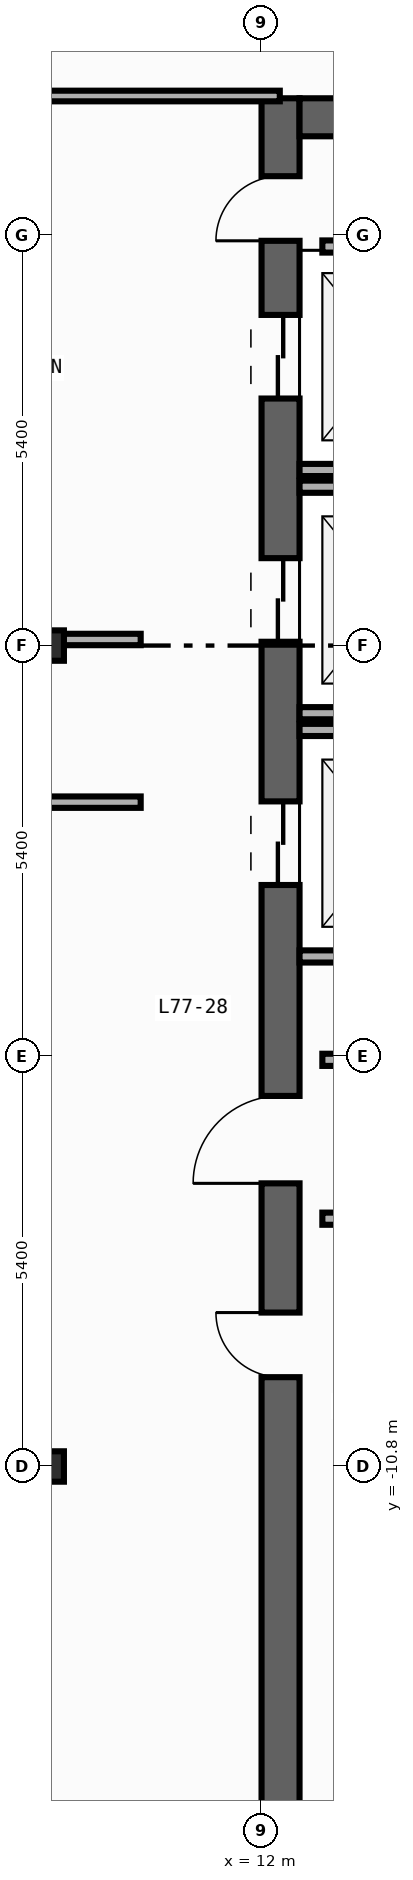
"""IFC4 building model, lengths in metres.
Left out: names, types, materials, properties, quantities, classifications, styles, units other than length and angle.
Written with IfcOpenShell. Run it as: python <this file> out.ifc"""

import sys

from ifc_helpers import new_model, si_unit, direction, frame, frame_2d, origin, origin_2d, place, context, subcontext, project, spatial, rectangle, i_section, extrude, element, fill, save


model = new_model("IFC4")
c1 = context("Model", 3, precision=1e-05, world=origin(), true_north=direction((0.0, 1.0)))
c2 = subcontext(c1, "Body", "Model", "MODEL_VIEW")
j1 = project(units=[si_unit("LENGTHUNIT", "METRE"), si_unit("PLANEANGLEUNIT", "RADIAN")], contexts=[c1])
p1 = place(None, origin())
s1 = spatial("IfcSite", under=j1, at=p1, CompositionType="ELEMENT")
p2 = place(p1, origin())
s2 = spatial("IfcBuilding", under=s1, at=p2, CompositionType="ELEMENT")
p3 = place(p2, frame((0.0, 0.0, 320.4)))
s3 = spatial("IfcBuildingStorey", under=s2, at=p3, CompositionType="ELEMENT", Elevation=320.4)
p4 = place(p3, frame((12.25, -19.8, 0.0), z_axis=(0.0, 0.0, 1.0), x_axis=(0.0, 1.0, 0.0)))
e1 = element("IfcWall", 1, at=p4, inside=s3, PredefinedType="SHEAR", context=c2, shape_type="SweptSolid", body=[
    extrude(rectangle(XDim=27.0, YDim=0.5, at=frame_2d((13.5, 0.0))), origin(), (0.0, 0.0, 1.0), 4.45),
])
p5 = place(p4, frame((23.05, 0.0, 0.0)))
e2 = element("IfcOpeningElement", 2, at=p5, cuts=e1, PredefinedType="OPENING", context=c2, shape_type="SweptSolid", body=[
    extrude(rectangle(XDim=1.1, YDim=2.2, at=frame_2d((0.55, 1.1))), frame((0.0, 0.26, 0.0), z_axis=(0.0, -1.0, 0.0), x_axis=(1.0, 0.0, 0.0)), (0.0, 0.0, 1.0), 0.52),
])
p6 = place(p4, frame((19.85, 0.0, 0.0)))
e3 = element("IfcOpeningElement", 3, at=p6, cuts=e1, PredefinedType="OPENING", context=c2, shape_type="SweptSolid", body=[
    extrude(rectangle(XDim=1.1, YDim=2.2, at=frame_2d((0.55, 1.1))), frame((0.0, 0.26, 0.0), z_axis=(0.0, -1.0, 0.0), x_axis=(1.0, 0.0, 0.0)), (0.0, 0.0, 1.0), 0.52),
])
p7 = place(p4, frame((16.65, 0.0, 0.0)))
e4 = element("IfcOpeningElement", 4, at=p7, cuts=e1, PredefinedType="OPENING", context=c2, shape_type="SweptSolid", body=[
    extrude(rectangle(XDim=1.1, YDim=2.2, at=frame_2d((0.55, 1.1))), frame((0.0, 0.26, 0.0), z_axis=(0.0, -1.0, 0.0), x_axis=(1.0, 0.0, 0.0)), (0.0, 0.0, 1.0), 0.52),
])
p8 = place(p4, frame((10.175, 0.0, 0.0)))
e5 = element("IfcOpeningElement", 5, at=p8, cuts=e1, PredefinedType="OPENING", context=c2, shape_type="SweptSolid", body=[
    extrude(rectangle(XDim=0.85, YDim=2.1, at=frame_2d((0.425, 1.05))), frame((0.0, 0.26, 0.0), z_axis=(0.0, -1.0, 0.0), x_axis=(1.0, 0.0, 0.0)), (0.0, 0.0, 1.0), 0.52),
])
p9 = place(p4, frame((12.725, 0.0, 0.0)))
e6 = element("IfcOpeningElement", 6, at=p9, cuts=e1, PredefinedType="OPENING", context=c2, shape_type="SweptSolid", body=[
    extrude(rectangle(XDim=1.15, YDim=2.2, at=frame_2d((0.575, 1.1))), frame((0.0, 0.26, 0.0), z_axis=(0.0, -1.0, 0.0), x_axis=(1.0, 0.0, 0.0)), (0.0, 0.0, 1.0), 0.52),
])
p10 = place(p4, frame((25.125, 0.0, 0.0)))
e7 = element("IfcOpeningElement", 7, at=p10, cuts=e1, PredefinedType="OPENING", context=c2, shape_type="SweptSolid", body=[
    extrude(rectangle(XDim=0.85, YDim=2.1, at=frame_2d((0.425, 1.05))), frame((0.0, 0.26, 0.0), z_axis=(0.0, -1.0, 0.0), x_axis=(1.0, 0.0, 0.0)), (0.0, 0.0, 1.0), 0.52),
])
p11 = place(p3, frame((12.5, 6.95, 0.0), z_axis=(0.0, 0.0, 1.0), x_axis=(1.0, 0.0, 0.0)))
e8 = element("IfcWall", 8, at=p11, inside=s3, PredefinedType="SHEAR", context=c2, shape_type="SweptSolid", body=[
    extrude(rectangle(XDim=7.4, YDim=0.5, at=frame_2d((3.7, 0.0))), origin(), (0.0, 0.0, 1.0), 4.45),
])
for number, where, z_axis, x_axis in (
    (9, (9.2, -10.8, 0.0), (0.0, 0.0, 1.0), (1.0, 0.0, 0.0)),
    (10, (9.2, 0.0, 0.0), (0.0, 0.0, 1.0), (1.0, 0.0, 0.0)),
):
    element("IfcColumn", number, at=place(p3, frame(where, z_axis=z_axis, x_axis=x_axis)), inside=s3, PredefinedType="COLUMN", context=c2, shape_type="SweptSolid", body=[
        extrude(i_section(OverallWidth=0.4, OverallDepth=0.4, WebThickness=0.013, FlangeThickness=0.021, FilletRadius=0.022, at=origin_2d()), origin(), (0.0, 0.0, 1.0), 4.8),
    ])
for number, where, z_axis, x_axis in (
    (11, (12.5, 2.31, 0.0), (0.0, 0.0, 1.0), (1.0, 0.0, 0.0)),
    (12, (12.5, -0.89, 0.0), (0.0, 0.0, 1.0), (1.0, 0.0, 0.0)),
    (13, (12.5, 2.09, 0.0), (0.0, 0.0, 1.0), (1.0, 0.0, 0.0)),
    (14, (12.5, -4.09, 0.0), (0.0, 0.0, 1.0), (1.0, 0.0, 0.0)),
    (15, (12.5, -1.11, 0.0), (0.0, 0.0, 1.0), (1.0, 0.0, 0.0)),
):
    element("IfcWall", number, at=place(p3, frame(where, z_axis=z_axis, x_axis=x_axis)), inside=s3, PredefinedType="STANDARD", context=c2, shape_type="SweptSolid", body=[
        extrude(rectangle(XDim=2.49, YDim=0.16, at=frame_2d((1.245, 0.0))), origin(), (0.0, 0.0, 1.0), 4.45),
    ])
for number, where, z_axis, x_axis in (
    (16, (12.8, -5.45, 0.0), (0.0, 0.0, 1.0), (1.0, 0.0, 0.0)),
    (17, (12.8, -7.54, 0.0), (0.0, 0.0, 1.0), (1.0, 0.0, 0.0)),
    (18, (12.8, 5.25, 0.0), (0.0, 0.0, 1.0), (1.0, 0.0, 0.0)),
):
    element("IfcWall", number, at=place(p3, frame(where, z_axis=z_axis, x_axis=x_axis)), inside=s3, PredefinedType="STANDARD", context=c2, shape_type="SweptSolid", body=[
        extrude(rectangle(XDim=2.6, YDim=0.16, at=frame_2d((1.3, 0.0))), origin(), (0.0, 0.0, 1.0), 4.45),
    ])
p12 = place(p3, frame((-10.41, -2.06, 0.0), z_axis=(0.0, 0.0, 1.0), x_axis=(1.0, 0.0, 0.0)))
e19 = element("IfcWall", 19, at=p12, inside=s3, PredefinedType="PARTITIONING", context=c2, shape_type="SweptSolid", body=[
    extrude(rectangle(XDim=20.82, YDim=0.15, at=frame_2d((10.41, 0.0))), origin(), (0.0, 0.0, 1.0), 4.45),
])
p13 = place(p12, frame((9.86, 0.0, 0.0)))
e20 = element("IfcOpeningElement", 20, at=p13, cuts=e19, PredefinedType="OPENING", context=c2, shape_type="SweptSolid", body=[
    extrude(rectangle(XDim=0.9, YDim=2.15, at=frame_2d((0.45, 1.075))), frame((0.0, 0.085, 0.0), z_axis=(0.0, -1.0, 0.0), x_axis=(1.0, 0.0, 0.0)), (0.0, 0.0, 1.0), 0.17),
])
p14 = place(p3, frame((4.7, 0.08, 0.0), z_axis=(0.0, 0.0, 1.0), x_axis=(1.0, 0.0, 0.0)))
e21 = element("IfcWall", 21, at=p14, inside=s3, PredefinedType="PARTITIONING", context=c2, shape_type="SweptSolid", body=[
    extrude(rectangle(XDim=5.71, YDim=0.15, at=frame_2d((2.855, 0.0))), origin(), (0.0, 0.0, 1.0), 3.55),
])
p15 = place(p14, frame((0.46, 0.0, 0.0)))
e22 = element("IfcOpeningElement", 22, at=p15, cuts=e21, PredefinedType="OPENING", context=c2, shape_type="SweptSolid", body=[
    extrude(rectangle(XDim=0.9, YDim=2.15, at=frame_2d((0.45, 1.075))), frame((0.0, 0.085, 0.0), z_axis=(0.0, -1.0, 0.0), x_axis=(1.0, 0.0, 0.0)), (0.0, 0.0, 1.0), 0.17),
])
p16 = place(p3, frame((4.52, 7.23, 0.0), z_axis=(0.0, 0.0, 1.0), x_axis=(1.0, 0.0, 0.0)))
e23 = element("IfcWall", 23, at=p16, inside=s3, PredefinedType="PARTITIONING", context=c2, shape_type="SweptSolid", body=[
    extrude(rectangle(XDim=7.72, YDim=0.14, at=frame_2d((3.86, 0.0))), origin(), (0.0, 0.0, 1.0), 3.55),
])
p17 = place(p16, frame((0.46, 0.0, 0.0)))
e24 = element("IfcOpeningElement", 24, at=p17, cuts=e23, PredefinedType="OPENING", context=c2, shape_type="SweptSolid", body=[
    extrude(rectangle(XDim=0.85, YDim=2.1, at=frame_2d((0.425, 1.05))), frame((0.0, 0.08, 0.0), z_axis=(0.0, -1.0, 0.0), x_axis=(1.0, 0.0, 0.0)), (0.0, 0.0, 1.0), 0.16),
])
p18 = place(p5, origin())
e25 = element("IfcDoor", 25, at=p18, inside=s3, OperationType="DOUBLE_DOOR_SLIDING", PredefinedType="DOOR", context=c2, shape_type="SweptSolid", body=[
    extrude(rectangle(XDim=1.1, YDim=2.2, at=frame_2d((0.55, 1.1))), frame((0.0, 0.025, 0.0), z_axis=(0.0, -1.0, 0.0), x_axis=(1.0, 0.0, 0.0)), (0.0, 0.0, 1.0), 0.05),
])
fill(e2, e25)
p19 = place(p6, origin())
e26 = element("IfcDoor", 26, at=p19, inside=s3, OperationType="DOUBLE_DOOR_SLIDING", PredefinedType="DOOR", context=c2, shape_type="SweptSolid", body=[
    extrude(rectangle(XDim=1.1, YDim=2.2, at=frame_2d((0.55, 1.1))), frame((0.0, 0.025, 0.0), z_axis=(0.0, -1.0, 0.0), x_axis=(1.0, 0.0, 0.0)), (0.0, 0.0, 1.0), 0.05),
])
fill(e3, e26)
p20 = place(p7, origin())
e27 = element("IfcDoor", 27, at=p20, inside=s3, OperationType="DOUBLE_DOOR_SLIDING", PredefinedType="DOOR", context=c2, shape_type="SweptSolid", body=[
    extrude(rectangle(XDim=1.1, YDim=2.2, at=frame_2d((0.55, 1.1))), frame((0.0, 0.025, 0.0), z_axis=(0.0, -1.0, 0.0), x_axis=(1.0, 0.0, 0.0)), (0.0, 0.0, 1.0), 0.05),
])
fill(e4, e27)
p21 = place(p8, origin())
e28 = element("IfcDoor", 28, at=p21, inside=s3, OperationType="SINGLE_SWING_RIGHT", PredefinedType="DOOR", context=c2, shape_type="SweptSolid", body=[
    extrude(rectangle(XDim=0.85, YDim=2.1, at=frame_2d((0.425, 1.05))), frame((0.0, 0.025, 0.0), z_axis=(0.0, -1.0, 0.0), x_axis=(1.0, 0.0, 0.0)), (0.0, 0.0, 1.0), 0.05),
])
fill(e5, e28)
p22 = place(p9, origin())
e29 = element("IfcDoor", 29, at=p22, inside=s3, OperationType="SINGLE_SWING_LEFT", PredefinedType="DOOR", context=c2, shape_type="SweptSolid", body=[
    extrude(rectangle(XDim=1.15, YDim=2.2, at=frame_2d((0.575, 1.1))), frame((0.0, 0.025, 0.0), z_axis=(0.0, -1.0, 0.0), x_axis=(1.0, 0.0, 0.0)), (0.0, 0.0, 1.0), 0.05),
])
fill(e6, e29)
p23 = place(p10, origin())
e30 = element("IfcDoor", 30, at=p23, inside=s3, OperationType="SINGLE_SWING_LEFT", PredefinedType="DOOR", context=c2, shape_type="SweptSolid", body=[
    extrude(rectangle(XDim=0.85, YDim=2.1, at=frame_2d((0.425, 1.05))), frame((0.0, 0.025, 0.0), z_axis=(0.0, -1.0, 0.0), x_axis=(1.0, 0.0, 0.0)), (0.0, 0.0, 1.0), 0.05),
])
fill(e7, e30)
save(model, sys.argv[1])
